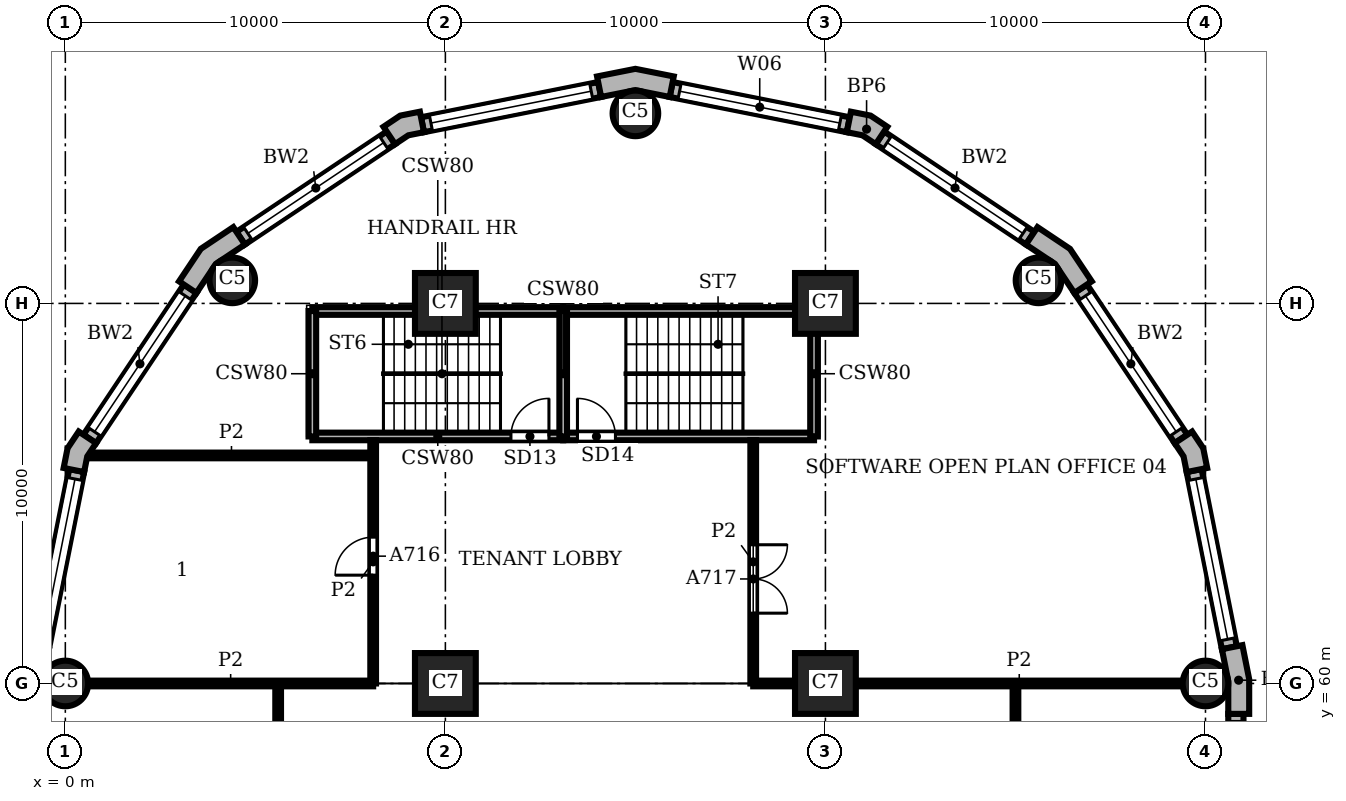
"""IFC4 building model, lengths in metres.
Left out: names, types, materials, properties, quantities, classifications, styles, units other than length and angle.
Written with IfcOpenShell. Run it as: python <this file> out.ifc"""

import sys

from ifc_helpers import new_model, si_unit, direction, frame, frame_2d, origin, origin_2d, place, context, subcontext, project, spatial, polyline, rectangle, circle, outline, extrude, element, fill, save


model = new_model("IFC4")
c1 = context("Model", 3, precision=1e-05, world=origin(), true_north=direction((0.0, 1.0)))
c2 = subcontext(c1, "Body", "Model", "MODEL_VIEW")
j1 = project(units=[si_unit("LENGTHUNIT", "METRE"), si_unit("PLANEANGLEUNIT", "RADIAN")], contexts=[c1])
p1 = place(None, origin())
s1 = spatial("IfcSite", under=j1, at=p1, CompositionType="ELEMENT")
p2 = place(p1, origin())
s2 = spatial("IfcBuilding", under=s1, at=p2, CompositionType="ELEMENT")
p3 = place(p2, frame((0.0, 0.0, 82.2)))
s3 = spatial("IfcBuildingStorey", under=s2, at=p3, CompositionType="ELEMENT", Elevation=82.2)
for number, where, z_axis, x_axis in (
    (1, (30.0, 60.0, 0.0), (0.0, 0.0, 1.0), (1.0, 0.0, 0.0)),
    (2, (25.607, 70.607, 0.0), (0.0, 0.0, 1.0), (1.0, 0.0, 0.0)),
    (3, (15.0, 75.0, 0.0), (0.0, 0.0, 1.0), (1.0, 0.0, 0.0)),
    (4, (4.393, 70.607, 0.0), (0.0, 0.0, 1.0), (1.0, 0.0, 0.0)),
    (5, (0.0, 60.0, 0.0), (0.0, 0.0, 1.0), (1.0, 0.0, 0.0)),
):
    element("IfcColumn", number, at=place(p3, frame(where, z_axis=z_axis, x_axis=x_axis)), inside=s3, PredefinedType="COLUMN", context=c2, shape_type="SweptSolid", body=[
        extrude(circle(Radius=0.6, at=origin_2d()), origin(), (0.0, 0.0, 1.0), 3.9),
    ])
for number, where, z_axis, x_axis in (
    (6, (10.0, 60.0, 0.0), (0.0, 0.0, 1.0), (1.0, 0.0, 0.0)),
    (7, (10.0, 70.0, 0.0), (0.0, 0.0, 1.0), (1.0, 0.0, 0.0)),
    (8, (20.0, 60.0, 0.0), (0.0, 0.0, 1.0), (1.0, 0.0, 0.0)),
    (9, (20.0, 70.0, 0.0), (0.0, 0.0, 1.0), (1.0, 0.0, 0.0)),
):
    element("IfcColumn", number, at=place(p3, frame(where, z_axis=z_axis, x_axis=x_axis)), inside=s3, PredefinedType="COLUMN", context=c2, shape_type="SweptSolid", body=[
        extrude(rectangle(XDim=1.6, YDim=1.6, at=origin_2d()), origin(), (0.0, 0.0, 1.0), 3.9),
    ])
p4 = place(p3, origin())
e10 = element("IfcWall", 10, at=p4, inside=s3, PredefinedType="SOLIDWALL", context=c2, shape_type="SweptSolid", body=[
    extrude(outline(polyline([(31.0, 59.2), (31.15, 59.2), (31.15, 60.113), (30.972, 61.009), (30.825, 60.98), (30.432, 60.902), (30.6, 60.059), (30.6, 59.2), (31.0, 59.2)])), origin(), (0.0, 0.0, 1.0), 3.9),
])
e11 = element("IfcWall", 11, at=p4, inside=s3, PredefinedType="SOLIDWALL", context=c2, shape_type="SweptSolid", body=[
    extrude(outline(polyline([(29.897, 65.641), (30.045, 65.67), (29.941, 66.189), (29.648, 66.629), (29.523, 66.545), (29.19, 66.323), (29.423, 65.974), (29.505, 65.563), (29.897, 65.641)])), origin(), (0.0, 0.0, 1.0), 3.9),
])
e12 = element("IfcWall", 12, at=p4, inside=s3, PredefinedType="SOLIDWALL", context=c2, shape_type="SweptSolid", body=[
    extrude(outline(polyline([(26.883, 70.497), (27.007, 70.58), (26.436, 71.436), (25.58, 72.007), (25.497, 71.883), (25.275, 71.55), (26.039, 71.039), (26.55, 70.275), (26.883, 70.497)])), origin(), (0.0, 0.0, 1.0), 3.9),
])
e13 = element("IfcWall", 13, at=p4, inside=s3, PredefinedType="SOLIDWALL", context=c2, shape_type="SweptSolid", body=[
    extrude(outline(polyline([(21.545, 74.523), (21.629, 74.648), (21.189, 74.941), (20.67, 75.045), (20.641, 74.897), (20.563, 74.505), (20.974, 74.423), (21.323, 74.19), (21.545, 74.523)])), origin(), (0.0, 0.0, 1.0), 3.9),
])
e14 = element("IfcWall", 14, at=p4, inside=s3, PredefinedType="SOLIDWALL", context=c2, shape_type="SweptSolid", body=[
    extrude(outline(polyline([(15.98, 75.825), (16.009, 75.972), (15.0, 76.173), (13.991, 75.972), (14.02, 75.825), (14.098, 75.432), (15.0, 75.612), (15.902, 75.432), (15.98, 75.825)])), origin(), (0.0, 0.0, 1.0), 3.9),
])
e15 = element("IfcWall", 15, at=p4, inside=s3, PredefinedType="SOLIDWALL", context=c2, shape_type="SweptSolid", body=[
    extrude(outline(polyline([(9.359, 74.897), (9.33, 75.045), (8.811, 74.941), (8.371, 74.648), (8.455, 74.523), (8.677, 74.19), (9.026, 74.423), (9.437, 74.505), (9.359, 74.897)])), origin(), (0.0, 0.0, 1.0), 3.9),
])
e16 = element("IfcWall", 16, at=p4, inside=s3, PredefinedType="SOLIDWALL", context=c2, shape_type="SweptSolid", body=[
    extrude(outline(polyline([(4.503, 71.883), (4.42, 72.007), (3.564, 71.436), (2.993, 70.58), (3.117, 70.497), (3.45, 70.275), (3.961, 71.039), (4.725, 71.55), (4.503, 71.883)])), origin(), (0.0, 0.0, 1.0), 3.9),
])
e17 = element("IfcWall", 17, at=p4, inside=s3, PredefinedType="SOLIDWALL", context=c2, shape_type="SweptSolid", body=[
    extrude(outline(polyline([(0.477, 66.545), (0.352, 66.629), (0.059, 66.189), (-0.045, 65.67), (0.103, 65.641), (0.495, 65.563), (0.577, 65.974), (0.81, 66.323), (0.477, 66.545)])), origin(), (0.0, 0.0, 1.0), 3.9),
])
p5 = place(p3, frame((30.8, 40.8, 0.0), z_axis=(0.0, 0.0, 1.0), x_axis=(0.0, 1.0, 0.0)))
e18 = element("IfcWall", 18, at=p5, inside=s3, PredefinedType="SOLIDWALL", context=c2, shape_type="SweptSolid", body=[
    extrude(rectangle(XDim=18.4, YDim=0.4, at=frame_2d((9.2, 0.0))), origin(), (0.0, 0.0, 1.0), 3.9),
])
p6 = place(p5, frame((0.2, 0.0, 0.9)))
e19 = element("IfcOpeningElement", 19, at=p6, cuts=e18, PredefinedType="OPENING", context=c2, shape_type="SweptSolid", body=[
    extrude(rectangle(XDim=8.0, YDim=2.35, at=frame_2d((4.0, 1.175))), frame((0.0, 0.21, 0.0), z_axis=(0.0, -1.0, 0.0), x_axis=(1.0, 0.0, 0.0)), (0.0, 0.0, 1.0), 0.42),
])
p7 = place(p5, frame((10.2, 0.0, 0.9)))
e20 = element("IfcOpeningElement", 20, at=p7, cuts=e18, PredefinedType="OPENING", context=c2, shape_type="SweptSolid", body=[
    extrude(rectangle(XDim=8.0, YDim=2.35, at=frame_2d((4.0, 1.175))), frame((0.0, 0.21, 0.0), z_axis=(0.0, -1.0, 0.0), x_axis=(1.0, 0.0, 0.0)), (0.0, 0.0, 1.0), 0.42),
])
p8 = place(p3, frame((30.629, 60.941, 0.0), z_axis=(0.0, 0.0, 1.0), x_axis=(-0.195098533057, 0.98078364709, 0.0)))
e21 = element("IfcWall", 21, at=p8, inside=s3, PredefinedType="SOLIDWALL", context=c2, shape_type="SweptSolid", body=[
    extrude(rectangle(XDim=4.753, YDim=0.4, at=frame_2d((2.376, 0.0))), origin(), (0.0, 0.0, 1.0), 3.9),
])
p9 = place(p8, frame((0.226, 0.0, 0.9)))
e22 = element("IfcOpeningElement", 22, at=p9, cuts=e21, PredefinedType="OPENING", context=c2, shape_type="SweptSolid", body=[
    extrude(rectangle(XDim=4.3, YDim=2.35, at=frame_2d((2.15, 1.175))), frame((0.0, 0.21, 0.0), z_axis=(0.0, -1.0, 0.0), x_axis=(1.0, 0.0, 0.0)), (0.0, 0.0, 1.0), 0.42),
])
p10 = place(p3, frame((29.357, 66.434, 0.0), z_axis=(0.0, 0.0, 1.0), x_axis=(-0.555541552266, 0.831488775454, 0.0)))
e23 = element("IfcWall", 23, at=p10, inside=s3, PredefinedType="SOLIDWALL", context=c2, shape_type="SweptSolid", body=[
    extrude(rectangle(XDim=4.753, YDim=0.4, at=frame_2d((2.376, 0.0))), origin(), (0.0, 0.0, 1.0), 3.9),
])
p11 = place(p10, frame((0.226, 0.0, 0.9)))
e24 = element("IfcOpeningElement", 24, at=p11, cuts=e23, PredefinedType="OPENING", context=c2, shape_type="SweptSolid", body=[
    extrude(rectangle(XDim=4.3, YDim=2.35, at=frame_2d((2.15, 1.175))), frame((0.0, 0.21, 0.0), z_axis=(0.0, -1.0, 0.0), x_axis=(1.0, 0.0, 0.0)), (0.0, 0.0, 1.0), 0.42),
])
p12 = place(p3, frame((25.386, 71.716, 0.0), z_axis=(0.0, 0.0, 1.0), x_axis=(-0.831488775454, 0.555541552266, 0.0)))
e25 = element("IfcWall", 25, at=p12, inside=s3, PredefinedType="SOLIDWALL", context=c2, shape_type="SweptSolid", body=[
    extrude(rectangle(XDim=4.753, YDim=0.4, at=frame_2d((2.376, 0.0))), origin(), (0.0, 0.0, 1.0), 3.9),
])
p13 = place(p12, frame((0.226, 0.0, 0.9)))
e26 = element("IfcOpeningElement", 26, at=p13, cuts=e25, PredefinedType="OPENING", context=c2, shape_type="SweptSolid", body=[
    extrude(rectangle(XDim=4.3, YDim=2.35, at=frame_2d((2.15, 1.175))), frame((0.0, 0.21, 0.0), z_axis=(0.0, -1.0, 0.0), x_axis=(1.0, 0.0, 0.0)), (0.0, 0.0, 1.0), 0.42),
])
p14 = place(p3, frame((20.602, 74.701, 0.0), z_axis=(0.0, 0.0, 1.0), x_axis=(-0.98078364709, 0.195098533057, 0.0)))
e27 = element("IfcWall", 27, at=p14, inside=s3, PredefinedType="SOLIDWALL", context=c2, shape_type="SweptSolid", body=[
    extrude(rectangle(XDim=4.753, YDim=0.4, at=frame_2d((2.376, 0.0))), origin(), (0.0, 0.0, 1.0), 3.9),
])
p15 = place(p14, frame((0.226, 0.0, 0.9)))
e28 = element("IfcOpeningElement", 28, at=p15, cuts=e27, PredefinedType="OPENING", context=c2, shape_type="SweptSolid", body=[
    extrude(rectangle(XDim=4.3, YDim=2.35, at=frame_2d((2.15, 1.175))), frame((0.0, 0.21, 0.0), z_axis=(0.0, -1.0, 0.0), x_axis=(1.0, 0.0, 0.0)), (0.0, 0.0, 1.0), 0.42),
])
p16 = place(p3, frame((14.059, 75.629, 0.0), z_axis=(0.0, 0.0, 1.0), x_axis=(-0.98078364709, -0.195098533057, 0.0)))
e29 = element("IfcWall", 29, at=p16, inside=s3, PredefinedType="SOLIDWALL", context=c2, shape_type="SweptSolid", body=[
    extrude(rectangle(XDim=4.753, YDim=0.4, at=frame_2d((2.376, 0.0))), origin(), (0.0, 0.0, 1.0), 3.9),
])
p17 = place(p16, frame((0.226, 0.0, 0.9)))
e30 = element("IfcOpeningElement", 30, at=p17, cuts=e29, PredefinedType="OPENING", context=c2, shape_type="SweptSolid", body=[
    extrude(rectangle(XDim=4.3, YDim=2.35, at=frame_2d((2.15, 1.175))), frame((0.0, 0.21, 0.0), z_axis=(0.0, -1.0, 0.0), x_axis=(1.0, 0.0, 0.0)), (0.0, 0.0, 1.0), 0.42),
])
p18 = place(p3, frame((8.566, 74.357, 0.0), z_axis=(0.0, 0.0, 1.0), x_axis=(-0.831488775454, -0.555541552266, 0.0)))
e31 = element("IfcWall", 31, at=p18, inside=s3, PredefinedType="SOLIDWALL", context=c2, shape_type="SweptSolid", body=[
    extrude(rectangle(XDim=4.753, YDim=0.4, at=frame_2d((2.376, 0.0))), origin(), (0.0, 0.0, 1.0), 3.9),
])
p19 = place(p18, frame((0.226, 0.0, 0.9)))
e32 = element("IfcOpeningElement", 32, at=p19, cuts=e31, PredefinedType="OPENING", context=c2, shape_type="SweptSolid", body=[
    extrude(rectangle(XDim=4.3, YDim=2.35, at=frame_2d((2.15, 1.175))), frame((0.0, 0.21, 0.0), z_axis=(0.0, -1.0, 0.0), x_axis=(1.0, 0.0, 0.0)), (0.0, 0.0, 1.0), 0.42),
])
p20 = place(p3, frame((3.284, 70.386, 0.0), z_axis=(0.0, 0.0, 1.0), x_axis=(-0.555541552266, -0.831488775454, 0.0)))
e33 = element("IfcWall", 33, at=p20, inside=s3, PredefinedType="SOLIDWALL", context=c2, shape_type="SweptSolid", body=[
    extrude(rectangle(XDim=4.753, YDim=0.4, at=frame_2d((2.376, 0.0))), origin(), (0.0, 0.0, 1.0), 3.9),
])
p21 = place(p20, frame((0.226, 0.0, 0.9)))
e34 = element("IfcOpeningElement", 34, at=p21, cuts=e33, PredefinedType="OPENING", context=c2, shape_type="SweptSolid", body=[
    extrude(rectangle(XDim=4.3, YDim=2.35, at=frame_2d((2.15, 1.175))), frame((0.0, 0.21, 0.0), z_axis=(0.0, -1.0, 0.0), x_axis=(1.0, 0.0, 0.0)), (0.0, 0.0, 1.0), 0.42),
])
p22 = place(p3, frame((0.299, 65.602, 0.0), z_axis=(0.0, 0.0, 1.0), x_axis=(-0.195098533057, -0.98078364709, 0.0)))
e35 = element("IfcWall", 35, at=p22, inside=s3, PredefinedType="SOLIDWALL", context=c2, shape_type="SweptSolid", body=[
    extrude(rectangle(XDim=4.753, YDim=0.4, at=frame_2d((2.376, 0.0))), origin(), (0.0, 0.0, 1.0), 3.9),
])
p23 = place(p22, frame((0.226, 0.0, 0.9)))
e36 = element("IfcOpeningElement", 36, at=p23, cuts=e35, PredefinedType="OPENING", context=c2, shape_type="SweptSolid", body=[
    extrude(rectangle(XDim=4.3, YDim=2.35, at=frame_2d((2.15, 1.175))), frame((0.0, 0.21, 0.0), z_axis=(0.0, -1.0, 0.0), x_axis=(1.0, 0.0, 0.0)), (0.0, 0.0, 1.0), 0.42),
])
p24 = place(p3, frame((6.5, 66.5, 0.0), z_axis=(0.0, 0.0, 1.0), x_axis=(1.0, 0.0, 0.0)))
e37 = element("IfcWall", 37, at=p24, inside=s3, PredefinedType="SHEAR", context=c2, shape_type="SweptSolid", body=[
    extrude(rectangle(XDim=6.6, YDim=0.2, at=frame_2d((3.3, 0.0))), origin(), (0.0, 0.0, 1.0), 3.58),
])
p25 = place(p24, frame((5.225, 0.0, 0.0)))
e38 = element("IfcOpeningElement", 38, at=p25, cuts=e37, PredefinedType="OPENING", context=c2, shape_type="SweptSolid", body=[
    extrude(rectangle(XDim=1.0, YDim=2.1, at=frame_2d((0.5, 1.05))), frame((0.0, 0.11, 0.0), z_axis=(0.0, -1.0, 0.0), x_axis=(1.0, 0.0, 0.0)), (0.0, 0.0, 1.0), 0.22),
])
p26 = place(p3, frame((13.1, 66.5, 0.0), z_axis=(0.0, 0.0, 1.0), x_axis=(1.0, 0.0, 0.0)))
e39 = element("IfcWall", 39, at=p26, inside=s3, PredefinedType="SHEAR", context=c2, shape_type="SweptSolid", body=[
    extrude(rectangle(XDim=6.6, YDim=0.2, at=frame_2d((3.3, 0.0))), origin(), (0.0, 0.0, 1.0), 3.58),
])
p27 = place(p26, frame((0.375, 0.0, 0.0)))
e40 = element("IfcOpeningElement", 40, at=p27, cuts=e39, PredefinedType="OPENING", context=c2, shape_type="SweptSolid", body=[
    extrude(rectangle(XDim=1.0, YDim=2.1, at=frame_2d((0.5, 1.05))), frame((0.0, 0.11, 0.0), z_axis=(0.0, -1.0, 0.0), x_axis=(1.0, 0.0, 0.0)), (0.0, 0.0, 1.0), 0.22),
])
p28 = place(p3, frame((6.5, 69.8, 0.0), z_axis=(0.0, 0.0, 1.0), x_axis=(1.0, 0.0, 0.0)))
e41 = element("IfcWall", 41, at=p28, inside=s3, PredefinedType="SHEAR", context=c2, shape_type="SweptSolid", body=[
    extrude(rectangle(XDim=6.6, YDim=0.2, at=frame_2d((3.3, 0.0))), origin(), (0.0, 0.0, 1.0), 3.58),
])
p29 = place(p3, frame((13.1, 69.8, 0.0), z_axis=(0.0, 0.0, 1.0), x_axis=(1.0, 0.0, 0.0)))
e42 = element("IfcWall", 42, at=p29, inside=s3, PredefinedType="SHEAR", context=c2, shape_type="SweptSolid", body=[
    extrude(rectangle(XDim=6.6, YDim=0.2, at=frame_2d((3.3, 0.0))), origin(), (0.0, 0.0, 1.0), 3.58),
])
for number, where, z_axis, x_axis in (
    (43, (6.5, 66.5, 0.0), (0.0, 0.0, 1.0), (0.0, 1.0, 0.0)),
    (44, (13.1, 66.5, 0.0), (0.0, 0.0, 1.0), (0.0, 1.0, 0.0)),
    (45, (19.7, 66.5, 0.0), (0.0, 0.0, 1.0), (0.0, 1.0, 0.0)),
):
    element("IfcWall", number, at=place(p3, frame(where, z_axis=z_axis, x_axis=x_axis)), inside=s3, PredefinedType="SHEAR", context=c2, shape_type="SweptSolid", body=[
        extrude(rectangle(XDim=3.3, YDim=0.2, at=frame_2d((1.65, 0.0))), origin(), (0.0, 0.0, 1.0), 3.58),
    ])
p30 = place(p3, frame((5.6, 5.6, 0.0), z_axis=(0.0, 0.0, 1.0), x_axis=(0.0, 1.0, 0.0)))
e46 = element("IfcWall", 46, at=p30, inside=s3, PredefinedType="PARTITIONING", context=c2, shape_type="SweptSolid", body=[
    extrude(rectangle(XDim=54.4, YDim=0.15, at=frame_2d((27.2, 0.0))), origin(), (0.0, 0.0, 1.0), 3.58),
])
p31 = place(p30, frame((40.8, 0.0, 0.0)))
e47 = element("IfcOpeningElement", 47, at=p31, cuts=e46, PredefinedType="OPENING", context=c2, shape_type="SweptSolid", body=[
    extrude(rectangle(XDim=1.8, YDim=2.1, at=frame_2d((0.9, 1.05))), frame((0.0, 0.085, 0.0), z_axis=(0.0, -1.0, 0.0), x_axis=(1.0, 0.0, 0.0)), (0.0, 0.0, 1.0), 0.17),
])
p32 = place(p3, frame((8.1, 60.0, 0.0), z_axis=(0.0, 0.0, 1.0), x_axis=(0.0, 1.0, 0.0)))
e48 = element("IfcWall", 48, at=p32, inside=s3, PredefinedType="PARTITIONING", context=c2, shape_type="SweptSolid", body=[
    extrude(rectangle(XDim=6.4, YDim=0.15, at=frame_2d((3.2, 0.0))), origin(), (0.0, 0.0, 1.0), 3.58),
])
p33 = place(p32, frame((2.85, 0.0, 0.0)))
e49 = element("IfcOpeningElement", 49, at=p33, cuts=e48, PredefinedType="OPENING", context=c2, shape_type="SweptSolid", body=[
    extrude(rectangle(XDim=1.0, YDim=2.1, at=frame_2d((0.5, 1.05))), frame((0.0, 0.085, 0.0), z_axis=(0.0, -1.0, 0.0), x_axis=(1.0, 0.0, 0.0)), (0.0, 0.0, 1.0), 0.17),
])
p34 = place(p3, frame((18.1, 60.0, 0.0), z_axis=(0.0, 0.0, 1.0), x_axis=(0.0, 1.0, 0.0)))
e50 = element("IfcWall", 50, at=p34, inside=s3, PredefinedType="PARTITIONING", context=c2, shape_type="SweptSolid", body=[
    extrude(rectangle(XDim=6.4, YDim=0.15, at=frame_2d((3.2, 0.0))), origin(), (0.0, 0.0, 1.0), 3.58),
])
p35 = place(p34, frame((1.85, 0.0, 0.0)))
e51 = element("IfcOpeningElement", 51, at=p35, cuts=e50, PredefinedType="OPENING", context=c2, shape_type="SweptSolid", body=[
    extrude(rectangle(XDim=1.8, YDim=2.1, at=frame_2d((0.9, 1.05))), frame((0.0, 0.085, 0.0), z_axis=(0.0, -1.0, 0.0), x_axis=(1.0, 0.0, 0.0)), (0.0, 0.0, 1.0), 0.17),
])
p36 = place(p3, frame((25.0, 57.3, 0.0), z_axis=(0.0, 0.0, 1.0), x_axis=(0.0, 1.0, 0.0)))
e52 = element("IfcWall", 52, at=p36, inside=s3, PredefinedType="PARTITIONING", context=c2, shape_type="SweptSolid", body=[
    extrude(rectangle(XDim=2.7, YDim=0.15, at=frame_2d((1.35, 0.0))), origin(), (0.0, 0.0, 1.0), 3.58),
])
p37 = place(p3, frame((0.6, 60.0, 0.0), z_axis=(0.0, 0.0, 1.0), x_axis=(1.0, 0.0, 0.0)))
e53 = element("IfcWall", 53, at=p37, inside=s3, PredefinedType="PARTITIONING", context=c2, shape_type="SweptSolid", body=[
    extrude(rectangle(XDim=7.5, YDim=0.15, at=frame_2d((3.75, 0.0))), origin(), (0.0, 0.0, 1.0), 3.58),
])
p38 = place(p3, frame((18.1, 60.0, 0.0), z_axis=(0.0, 0.0, 1.0), x_axis=(1.0, 0.0, 0.0)))
e54 = element("IfcWall", 54, at=p38, inside=s3, PredefinedType="PARTITIONING", context=c2, shape_type="SweptSolid", body=[
    extrude(rectangle(XDim=1.1, YDim=0.15, at=frame_2d((0.55, 0.0))), origin(), (0.0, 0.0, 1.0), 3.58),
])
p39 = place(p3, frame((20.8, 60.0, 0.0), z_axis=(0.0, 0.0, 1.0), x_axis=(1.0, 0.0, 0.0)))
e55 = element("IfcWall", 55, at=p39, inside=s3, PredefinedType="PARTITIONING", context=c2, shape_type="SweptSolid", body=[
    extrude(rectangle(XDim=8.6, YDim=0.15, at=frame_2d((4.3, 0.0))), origin(), (0.0, 0.0, 1.0), 3.58),
])
p40 = place(p3, frame((0.644, 66.0, 0.0), z_axis=(0.0, 0.0, 1.0), x_axis=(1.0, 0.0, 0.0)))
e56 = element("IfcWall", 56, at=p40, inside=s3, PredefinedType="PARTITIONING", context=c2, shape_type="SweptSolid", body=[
    extrude(rectangle(XDim=7.456, YDim=0.15, at=frame_2d((3.728, 0.0))), origin(), (0.0, 0.0, 1.0), 3.58),
])
p41 = place(p9, origin())
e57 = element("IfcWindow", 57, at=p41, inside=s3, PartitioningType="SINGLE_PANEL", PredefinedType="WINDOW", context=c2, shape_type="SweptSolid", body=[
    extrude(rectangle(XDim=4.3, YDim=2.35, at=frame_2d((2.15, 1.175))), frame((0.0, 0.16, 0.0), z_axis=(0.0, -1.0, 0.0), x_axis=(1.0, 0.0, 0.0)), (0.0, 0.0, 1.0), 0.06),
])
fill(e22, e57)
p42 = place(p11, origin())
e58 = element("IfcWindow", 58, at=p42, inside=s3, PartitioningType="SINGLE_PANEL", PredefinedType="WINDOW", context=c2, shape_type="SweptSolid", body=[
    extrude(rectangle(XDim=4.3, YDim=2.35, at=frame_2d((2.15, 1.175))), frame((0.0, 0.16, 0.0), z_axis=(0.0, -1.0, 0.0), x_axis=(1.0, 0.0, 0.0)), (0.0, 0.0, 1.0), 0.06),
])
fill(e24, e58)
p43 = place(p13, origin())
e59 = element("IfcWindow", 59, at=p43, inside=s3, PartitioningType="SINGLE_PANEL", PredefinedType="WINDOW", context=c2, shape_type="SweptSolid", body=[
    extrude(rectangle(XDim=4.3, YDim=2.35, at=frame_2d((2.15, 1.175))), frame((0.0, 0.16, 0.0), z_axis=(0.0, -1.0, 0.0), x_axis=(1.0, 0.0, 0.0)), (0.0, 0.0, 1.0), 0.06),
])
fill(e26, e59)
p44 = place(p15, origin())
e60 = element("IfcWindow", 60, at=p44, inside=s3, PartitioningType="SINGLE_PANEL", PredefinedType="WINDOW", context=c2, shape_type="SweptSolid", body=[
    extrude(rectangle(XDim=4.3, YDim=2.35, at=frame_2d((2.15, 1.175))), frame((0.0, 0.16, 0.0), z_axis=(0.0, -1.0, 0.0), x_axis=(1.0, 0.0, 0.0)), (0.0, 0.0, 1.0), 0.06),
])
fill(e28, e60)
p45 = place(p17, origin())
e61 = element("IfcWindow", 61, at=p45, inside=s3, PartitioningType="SINGLE_PANEL", PredefinedType="WINDOW", context=c2, shape_type="SweptSolid", body=[
    extrude(rectangle(XDim=4.3, YDim=2.35, at=frame_2d((2.15, 1.175))), frame((0.0, 0.16, 0.0), z_axis=(0.0, -1.0, 0.0), x_axis=(1.0, 0.0, 0.0)), (0.0, 0.0, 1.0), 0.06),
])
fill(e30, e61)
p46 = place(p19, origin())
e62 = element("IfcWindow", 62, at=p46, inside=s3, PartitioningType="SINGLE_PANEL", PredefinedType="WINDOW", context=c2, shape_type="SweptSolid", body=[
    extrude(rectangle(XDim=4.3, YDim=2.35, at=frame_2d((2.15, 1.175))), frame((0.0, 0.16, 0.0), z_axis=(0.0, -1.0, 0.0), x_axis=(1.0, 0.0, 0.0)), (0.0, 0.0, 1.0), 0.06),
])
fill(e32, e62)
p47 = place(p21, origin())
e63 = element("IfcWindow", 63, at=p47, inside=s3, PartitioningType="SINGLE_PANEL", PredefinedType="WINDOW", context=c2, shape_type="SweptSolid", body=[
    extrude(rectangle(XDim=4.3, YDim=2.35, at=frame_2d((2.15, 1.175))), frame((0.0, 0.16, 0.0), z_axis=(0.0, -1.0, 0.0), x_axis=(1.0, 0.0, 0.0)), (0.0, 0.0, 1.0), 0.06),
])
fill(e34, e63)
p48 = place(p23, origin())
e64 = element("IfcWindow", 64, at=p48, inside=s3, PartitioningType="SINGLE_PANEL", PredefinedType="WINDOW", context=c2, shape_type="SweptSolid", body=[
    extrude(rectangle(XDim=4.3, YDim=2.35, at=frame_2d((2.15, 1.175))), frame((0.0, 0.16, 0.0), z_axis=(0.0, -1.0, 0.0), x_axis=(1.0, 0.0, 0.0)), (0.0, 0.0, 1.0), 0.06),
])
fill(e36, e64)
p49 = place(p25, origin())
e65 = element("IfcDoor", 65, at=p49, inside=s3, OperationType="SINGLE_SWING_RIGHT", PredefinedType="DOOR", context=c2, shape_type="SweptSolid", body=[
    extrude(rectangle(XDim=1.0, YDim=2.1, at=frame_2d((0.5, 1.05))), frame((0.0, 0.025, 0.0), z_axis=(0.0, -1.0, 0.0), x_axis=(1.0, 0.0, 0.0)), (0.0, 0.0, 1.0), 0.05),
])
fill(e38, e65)
p50 = place(p27, origin())
e66 = element("IfcDoor", 66, at=p50, inside=s3, OperationType="SINGLE_SWING_LEFT", PredefinedType="DOOR", context=c2, shape_type="SweptSolid", body=[
    extrude(rectangle(XDim=1.0, YDim=2.1, at=frame_2d((0.5, 1.05))), frame((0.0, 0.025, 0.0), z_axis=(0.0, -1.0, 0.0), x_axis=(1.0, 0.0, 0.0)), (0.0, 0.0, 1.0), 0.05),
])
fill(e40, e66)
p51 = place(p33, origin())
e67 = element("IfcDoor", 67, at=p51, inside=s3, OperationType="SINGLE_SWING_LEFT", PredefinedType="DOOR", context=c2, shape_type="SweptSolid", body=[
    extrude(rectangle(XDim=1.0, YDim=2.1, at=frame_2d((0.5, 1.05))), frame((0.0, 0.025, 0.0), z_axis=(0.0, -1.0, 0.0), x_axis=(1.0, 0.0, 0.0)), (0.0, 0.0, 1.0), 0.05),
])
fill(e49, e67)
p52 = place(p35, frame((1.8, 0.0, 0.0), z_axis=(0.0, 0.0, 1.0), x_axis=(-1.0, 0.0, 0.0)))
e68 = element("IfcDoor", 68, at=p52, inside=s3, OperationType="DOUBLE_DOOR_SINGLE_SWING", PredefinedType="DOOR", context=c2, shape_type="SweptSolid", body=[
    extrude(rectangle(XDim=1.8, YDim=2.1, at=frame_2d((0.9, 1.05))), frame((0.0, 0.025, 0.0), z_axis=(0.0, -1.0, 0.0), x_axis=(1.0, 0.0, 0.0)), (0.0, 0.0, 1.0), 0.05),
])
fill(e51, e68)
save(model, sys.argv[1])
